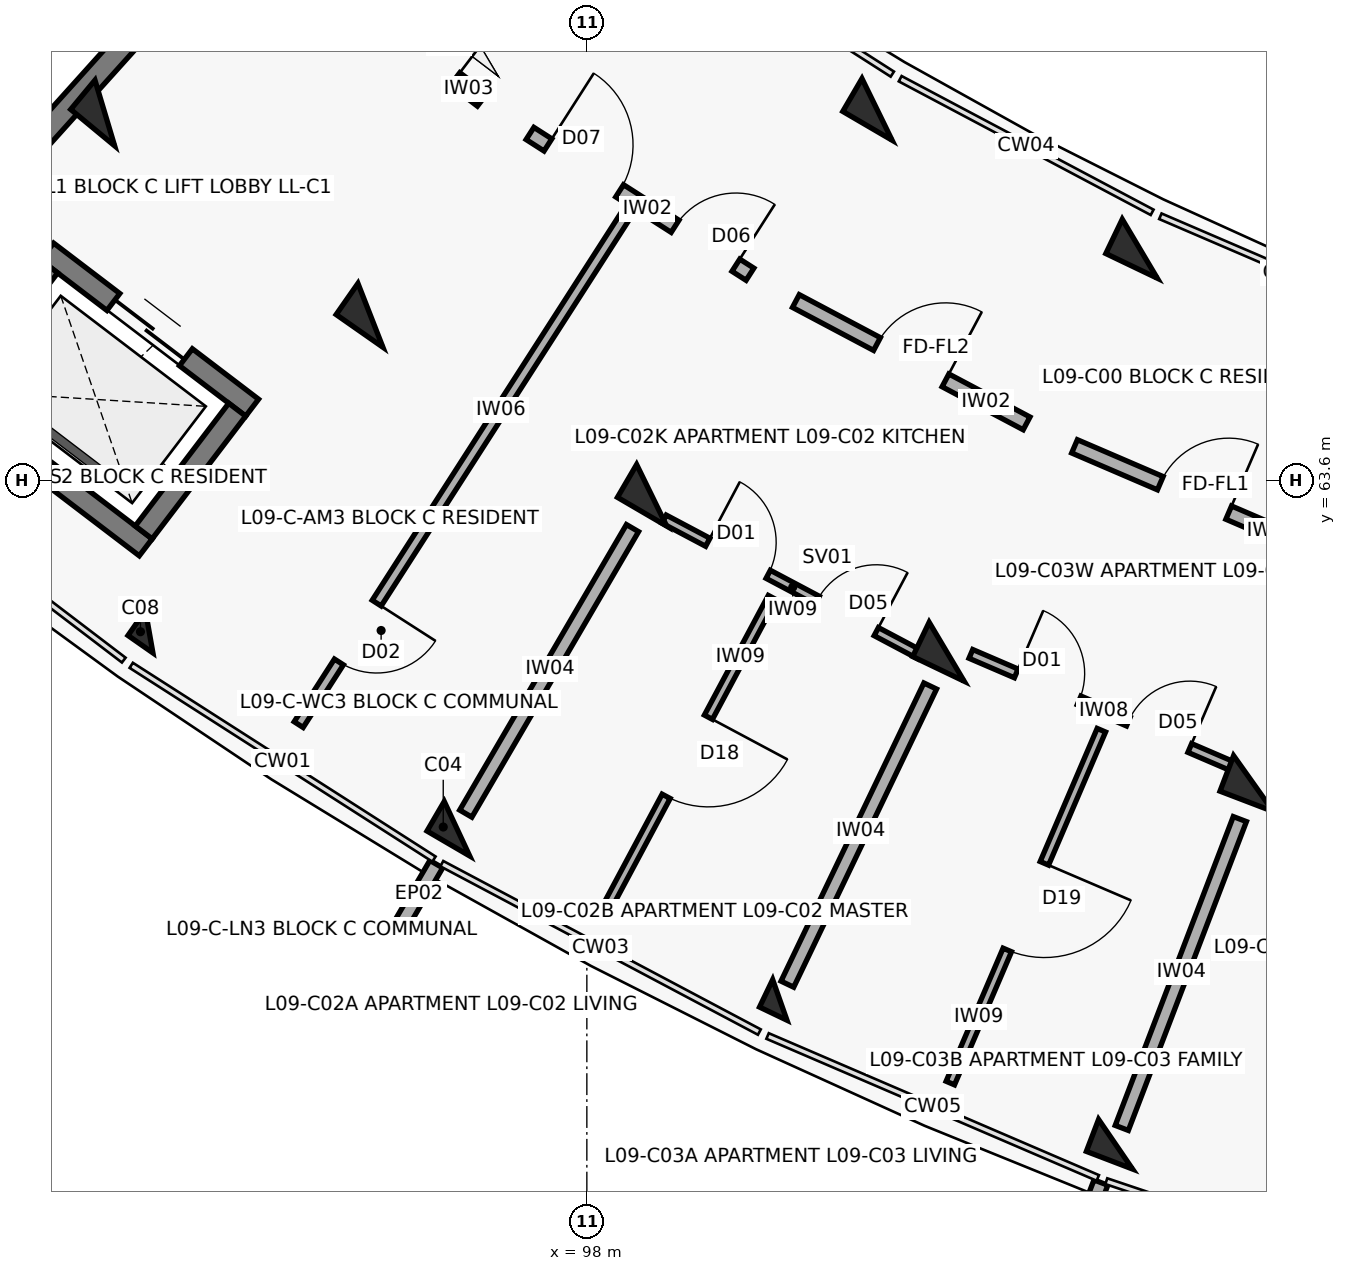
"""IFC4 building model, lengths in metres.
Left out: names, types, materials, properties, quantities, classifications, styles, units other than length and angle.
Written with IfcOpenShell. Run it as: python <this file> out.ifc"""

import sys

from ifc_helpers import new_model, si_unit, direction, frame, frame_2d, origin, origin_2d, place, context, subcontext, project, spatial, rectangle, extrude, element, fill, save


model = new_model("IFC4")
c1 = context("Model", 3, precision=1e-05, world=origin(), true_north=direction((0.0, 1.0)))
c2 = subcontext(c1, "Body", "Model", "MODEL_VIEW")
j1 = project(units=[si_unit("LENGTHUNIT", "METRE"), si_unit("PLANEANGLEUNIT", "RADIAN")], contexts=[c1])
p1 = place(None, origin())
s1 = spatial("IfcSite", under=j1, at=p1, CompositionType="ELEMENT")
p2 = place(p1, origin())
s2 = spatial("IfcBuilding", under=s1, at=p2, CompositionType="ELEMENT")
p3 = place(p2, frame((0.0, 0.0, 29.8)))
s3 = spatial("IfcBuildingStorey", under=s2, at=p3, CompositionType="ELEMENT", Elevation=29.8)
for number, where, z_axis, x_axis in (
    (1, (91.658, 68.43, 0.0), (0.0, 0.0, 1.0), (-0.638, -0.77, 0.0)),
    (2, (95.152, 65.768, 0.0), (0.0, 0.0, 1.0), (-0.573, -0.82, 0.0)),
):
    element("IfcColumn", number, at=place(p3, frame(where, z_axis=z_axis, x_axis=x_axis)), inside=s3, PredefinedType="COLUMN", context=c2, shape_type="SweptSolid", body=[
        extrude(rectangle(XDim=0.5, YDim=0.75, at=origin_2d()), origin(), (0.0, 0.0, 1.0), 3.1),
    ])
p4 = place(p3, frame((92.241, 61.605, 0.0), z_axis=(0.0, 0.0, 1.0), x_axis=(-0.573004420611, -0.819552276527, 0.0)))
e3 = element("IfcColumn", 3, at=p4, inside=s3, PredefinedType="COLUMN", context=c2, shape_type="SweptSolid", body=[
    extrude(rectangle(XDim=0.4, YDim=0.4, at=origin_2d()), origin(), (0.0, 0.0, 1.0), 3.1),
])
for number, where, z_axis, x_axis in (
    (4, (101.817, 68.478, 0.0), (0.0, 0.0, 1.0), (-0.504, -0.864, 0.0)),
    (5, (98.853, 63.4, 0.0), (0.0, 0.0, 1.0), (-0.504, -0.864, 0.0)),
):
    element("IfcColumn", number, at=place(p3, frame(where, z_axis=z_axis, x_axis=x_axis)), inside=s3, PredefinedType="COLUMN", context=c2, shape_type="SweptSolid", body=[
        extrude(rectangle(XDim=0.5, YDim=0.75, at=origin_2d()), origin(), (0.0, 0.0, 1.0), 3.1),
    ])
p5 = place(p3, frame((96.291, 59.013, 0.0), z_axis=(0.0, 0.0, 1.0), x_axis=(-0.504226211181, -0.863571611366, 0.0)))
e6 = element("IfcColumn", 6, at=p5, inside=s3, PredefinedType="COLUMN", context=c2, shape_type="SweptSolid", body=[
    extrude(rectangle(XDim=0.45, YDim=0.65, at=origin_2d()), origin(), (0.0, 0.0, 1.0), 3.1),
])
for number, where, z_axis, x_axis in (
    (7, (105.274, 66.644, 0.0), (0.0, 0.0, 1.0), (-0.432, -0.902, 0.0)),
    (8, (102.734, 61.341, 0.0), (0.0, 0.0, 1.0), (-0.432, -0.902, 0.0)),
):
    element("IfcColumn", number, at=place(p3, frame(where, z_axis=z_axis, x_axis=x_axis)), inside=s3, PredefinedType="COLUMN", context=c2, shape_type="SweptSolid", body=[
        extrude(rectangle(XDim=0.5, YDim=0.75, at=origin_2d()), origin(), (0.0, 0.0, 1.0), 3.1),
    ])
p6 = place(p3, frame((100.539, 56.76, 0.0), z_axis=(0.0, 0.0, 1.0), x_axis=(-0.432085748802, -0.901832526405, 0.0)))
e9 = element("IfcColumn", 9, at=p6, inside=s3, PredefinedType="COLUMN", context=c2, shape_type="SweptSolid", body=[
    extrude(rectangle(XDim=0.4, YDim=0.4, at=origin_2d()), origin(), (0.0, 0.0, 1.0), 3.1),
])
p7 = place(p3, frame((106.77, 59.606, 0.0), z_axis=(0.0, 0.0, 1.0), x_axis=(-0.357064076459, -0.934079892355, 0.0)))
e10 = element("IfcColumn", 10, at=p7, inside=s3, PredefinedType="COLUMN", context=c2, shape_type="SweptSolid", body=[
    extrude(rectangle(XDim=0.5, YDim=0.75, at=origin_2d()), origin(), (0.0, 0.0, 1.0), 3.1),
])
p8 = place(p3, frame((104.956, 54.861, 0.0), z_axis=(0.0, 0.0, 1.0), x_axis=(-0.357064076459, -0.934079892355, 0.0)))
e11 = element("IfcColumn", 11, at=p8, inside=s3, PredefinedType="COLUMN", context=c2, shape_type="SweptSolid", body=[
    extrude(rectangle(XDim=0.45, YDim=0.65, at=origin_2d()), origin(), (0.0, 0.0, 1.0), 3.1),
])
for number, where, z_axis, x_axis in (
    (12, (96.019, 58.547, 0.0), (0.0, 0.0, 1.0), (-0.504, -0.864, 0.0)),
    (13, (104.763, 54.357, 0.0), (0.0, 0.0, 1.0), (-0.357, -0.934, 0.0)),
):
    element("IfcWall", number, at=place(p3, frame(where, z_axis=z_axis, x_axis=x_axis)), inside=s3, PredefinedType="PARAPET", context=c2, shape_type="SweptSolid", body=[
        extrude(rectangle(XDim=0.9, YDim=0.195, at=frame_2d((0.45, 0.0))), origin(), (0.0, 0.0, 1.0), 2.25),
    ])
p9 = place(p3, frame((93.325, 70.899, 0.0), z_axis=(0.0, 0.0, 1.0), x_axis=(-0.668868253964, -0.743380964808, 0.0)))
e14 = element("IfcWall", 14, at=p9, inside=s3, PredefinedType="SHEAR", context=c2, shape_type="SweptSolid", body=[
    extrude(rectangle(XDim=7.69, YDim=0.3, at=frame_2d((3.845, 0.0))), origin(), (0.0, 0.0, 1.0), 3.1),
])
p10 = place(p3, frame((90.899, 66.607, 0.0), z_axis=(0.0, 0.0, 1.0), x_axis=(0.795439986025, -0.606032365994, 0.0)))
e15 = element("IfcWall", 15, at=p10, inside=s3, PredefinedType="SHEAR", context=c2, shape_type="SweptSolid", body=[
    extrude(rectangle(XDim=3.39, YDim=0.28, at=frame_2d((1.695, 0.0))), origin(), (0.0, 0.0, 1.0), 3.1),
])
p11 = place(p10, frame((1.095, 0.0, 0.0)))
e16 = element("IfcOpeningElement", 16, at=p11, cuts=e15, PredefinedType="OPENING", context=c2, shape_type="SweptSolid", body=[
    extrude(rectangle(XDim=1.2, YDim=2.15, at=frame_2d((0.6, 1.075))), frame((0.0, 0.15, 0.0), z_axis=(0.0, -1.0, 0.0), x_axis=(1.0, 0.0, 0.0)), (0.0, 0.0, 1.0), 0.3),
])
p12 = place(p3, frame((89.5, 64.77, 0.0), z_axis=(0.0, 0.0, 1.0), x_axis=(0.795474703455, -0.605986795371, 0.0)))
e17 = element("IfcWall", 17, at=p12, inside=s3, PredefinedType="SHEAR", context=c2, shape_type="SweptSolid", body=[
    extrude(rectangle(XDim=3.39, YDim=0.28, at=frame_2d((1.695, 0.0))), origin(), (0.0, 0.0, 1.0), 3.1),
])
p13 = place(p3, frame((90.926, 66.411, 0.0), z_axis=(0.0, 0.0, 1.0), x_axis=(-0.605948992168, -0.795503500238, 0.0)))
e18 = element("IfcWall", 18, at=p13, inside=s3, PredefinedType="SHEAR", context=c2, shape_type="SweptSolid", body=[
    extrude(rectangle(XDim=2.03, YDim=0.28, at=frame_2d((1.015, 0.0))), origin(), (0.0, 0.0, 1.0), 3.1),
])
p14 = place(p3, frame((93.4, 64.526, 0.0), z_axis=(0.0, 0.0, 1.0), x_axis=(-0.605891019062, -0.795547656033, 0.0)))
e19 = element("IfcWall", 19, at=p14, inside=s3, PredefinedType="SHEAR", context=c2, shape_type="SweptSolid", body=[
    extrude(rectangle(XDim=2.03, YDim=0.28, at=frame_2d((1.015, 0.0))), origin(), (0.0, 0.0, 1.0), 3.1),
])
p15 = place(p3, frame((94.001, 70.602, 0.0), z_axis=(0.0, 0.0, 1.0), x_axis=(0.795498026433, -0.605956178235, 0.0)))
e20 = element("IfcWall", 20, at=p15, inside=s3, PredefinedType="SOLIDWALL", context=c2, shape_type="SweptSolid", body=[
    extrude(rectangle(XDim=3.296, YDim=0.21, at=frame_2d((1.648, 0.0))), origin(), (0.0, 0.0, 1.0), 2.14),
])
p16 = place(p15, frame((0.45, 0.0, 0.0)))
e21 = element("IfcOpeningElement", 21, at=p16, cuts=e20, PredefinedType="OPENING", context=c2, shape_type="SweptSolid", body=[
    extrude(rectangle(XDim=1.1, YDim=2.15, at=frame_2d((0.55, 1.075))), frame((0.0, 0.115, 0.0), z_axis=(0.0, -1.0, 0.0), x_axis=(1.0, 0.0, 0.0)), (0.0, 0.0, 1.0), 0.23),
])
p17 = place(p15, frame((1.726, 0.0, 0.0)))
e22 = element("IfcOpeningElement", 22, at=p17, cuts=e20, PredefinedType="OPENING", context=c2, shape_type="SweptSolid", body=[
    extrude(rectangle(XDim=1.12, YDim=2.15, at=frame_2d((0.56, 1.075))), frame((0.0, 0.115, 0.0), z_axis=(0.0, -1.0, 0.0), x_axis=(1.0, 0.0, 0.0)), (0.0, 0.0, 1.0), 0.23),
])
p18 = place(p3, frame((97.252, 68.161, 0.0), z_axis=(0.0, 0.0, 1.0), x_axis=(0.842289466461, -0.53902546757, 0.0)))
e23 = element("IfcWall", 23, at=p18, inside=s3, PredefinedType="SOLIDWALL", context=c2, shape_type="SweptSolid", body=[
    extrude(rectangle(XDim=3.436, YDim=0.19, at=frame_2d((1.718, 0.0))), origin(), (0.0, 0.0, 1.0), 2.14),
])
p19 = place(p18, frame((0.28, 0.0, 0.0)))
e24 = element("IfcOpeningElement", 24, at=p19, cuts=e23, PredefinedType="OPENING", context=c2, shape_type="SweptSolid", body=[
    extrude(rectangle(XDim=1.12, YDim=2.15, at=frame_2d((0.56, 1.075))), frame((0.0, 0.105, 0.0), z_axis=(0.0, -1.0, 0.0), x_axis=(1.0, 0.0, 0.0)), (0.0, 0.0, 1.0), 0.21),
])
p20 = place(p18, frame((2.266, 0.0, 0.0)))
e25 = element("IfcOpeningElement", 25, at=p20, cuts=e23, PredefinedType="OPENING", context=c2, shape_type="SweptSolid", body=[
    extrude(rectangle(XDim=0.95, YDim=2.1, at=frame_2d((0.475, 1.05))), frame((0.0, 0.105, 0.0), z_axis=(0.0, -1.0, 0.0), x_axis=(1.0, 0.0, 0.0)), (0.0, 0.0, 1.0), 0.21),
])
p21 = place(p3, frame((98.504, 67.072, 0.0), z_axis=(0.0, 0.0, 1.0), x_axis=(-0.540338452216, -0.841447774408, 0.0)))
e26 = element("IfcWall", 26, at=p21, inside=s3, PredefinedType="PARTITIONING", context=c2, shape_type="SweptSolid", body=[
    extrude(rectangle(XDim=7.95, YDim=0.14, at=frame_2d((3.975, 0.0))), origin(), (0.0, 0.0, 1.0), 2.14),
])
p22 = place(p21, frame((6.05, 0.0, 0.0)))
e27 = element("IfcOpeningElement", 27, at=p22, cuts=e26, PredefinedType="OPENING", context=c2, shape_type="SweptSolid", body=[
    extrude(rectangle(XDim=0.92, YDim=2.1, at=frame_2d((0.46, 1.05))), frame((0.0, 0.08, 0.0), z_axis=(0.0, -1.0, 0.0), x_axis=(1.0, 0.0, 0.0)), (0.0, 0.0, 1.0), 0.16),
])
p23 = place(p3, frame((100.75, 65.956, 0.0), z_axis=(0.0, 0.0, 1.0), x_axis=(0.883440266101, -0.468543803963, 0.0)))
e28 = element("IfcWall", 28, at=p23, inside=s3, PredefinedType="SOLIDWALL", context=c2, shape_type="SweptSolid", body=[
    extrude(rectangle(XDim=3.436, YDim=0.19, at=frame_2d((1.718, 0.0))), origin(), (0.0, 0.0, 1.0), 2.14),
])
p24 = place(p23, frame((1.208, 0.0, 0.0)))
e29 = element("IfcOpeningElement", 29, at=p24, cuts=e28, PredefinedType="OPENING", context=c2, shape_type="SweptSolid", body=[
    extrude(rectangle(XDim=1.02, YDim=2.15, at=frame_2d((0.51, 1.075))), frame((0.0, 0.105, 0.0), z_axis=(0.0, -1.0, 0.0), x_axis=(1.0, 0.0, 0.0)), (0.0, 0.0, 1.0), 0.21),
])
p25 = place(p3, frame((99.017, 63.087, 0.0), z_axis=(0.0, 0.0, 1.0), x_axis=(0.883415075746, -0.468591297342, 0.0)))
e30 = element("IfcWall", 30, at=p25, inside=s3, PredefinedType="PARTITIONING", context=c2, shape_type="SweptSolid", body=[
    extrude(rectangle(XDim=3.81, YDim=0.12, at=frame_2d((1.905, 0.0))), origin(), (0.0, 0.0, 1.0), 2.14),
])
p26 = place(p25, frame((0.65, 0.0, 0.0)))
e31 = element("IfcOpeningElement", 31, at=p26, cuts=e30, PredefinedType="OPENING", context=c2, shape_type="SweptSolid", body=[
    extrude(rectangle(XDim=0.9, YDim=2.1, at=frame_2d((0.45, 1.05))), frame((0.0, 0.07, 0.0), z_axis=(0.0, -1.0, 0.0), x_axis=(1.0, 0.0, 0.0)), (0.0, 0.0, 1.0), 0.14),
])
p27 = place(p25, frame((2.28, 0.0, 0.0)))
e32 = element("IfcOpeningElement", 32, at=p27, cuts=e30, PredefinedType="OPENING", context=c2, shape_type="SweptSolid", body=[
    extrude(rectangle(XDim=0.88, YDim=2.1, at=frame_2d((0.44, 1.05))), frame((0.0, 0.07, 0.0), z_axis=(0.0, -1.0, 0.0), x_axis=(1.0, 0.0, 0.0)), (0.0, 0.0, 1.0), 0.14),
])
p28 = place(p3, frame((100.44, 62.054, 0.0), z_axis=(0.0, 0.0, 1.0), x_axis=(-0.471207016772, -0.882022645596, 0.0)))
e33 = element("IfcWall", 33, at=p28, inside=s3, PredefinedType="PARTITIONING", context=c2, shape_type="SweptSolid", body=[
    extrude(rectangle(XDim=4.75, YDim=0.12, at=frame_2d((2.375, 0.0))), origin(), (0.0, 0.0, 1.0), 2.14),
])
p29 = place(p28, frame((1.785, 0.0, 0.0)))
e34 = element("IfcOpeningElement", 34, at=p29, cuts=e33, PredefinedType="OPENING", context=c2, shape_type="SweptSolid", body=[
    extrude(rectangle(XDim=1.18, YDim=2.1, at=frame_2d((0.59, 1.05))), frame((0.0, 0.07, 0.0), z_axis=(0.0, -1.0, 0.0), x_axis=(1.0, 0.0, 0.0)), (0.0, 0.0, 1.0), 0.14),
])
p30 = place(p3, frame((98.601, 62.968, 0.0), z_axis=(0.0, 0.0, 1.0), x_axis=(-0.504216452091, -0.863577309475, 0.0)))
e35 = element("IfcWall", 35, at=p30, inside=s3, PredefinedType="SOLIDWALL", context=c2, shape_type="SweptSolid", body=[
    extrude(rectangle(XDim=4.35, YDim=0.185, at=frame_2d((2.175, 0.0))), origin(), (0.0, 0.0, 1.0), 2.14),
])
p31 = place(p3, frame((104.417, 64.044, 0.0), z_axis=(0.0, 0.0, 1.0), x_axis=(0.918718172399, -0.394913813008, 0.0)))
e36 = element("IfcWall", 36, at=p31, inside=s3, PredefinedType="SOLIDWALL", context=c2, shape_type="SweptSolid", body=[
    extrude(rectangle(XDim=3.436, YDim=0.19, at=frame_2d((1.718, 0.0))), origin(), (0.0, 0.0, 1.0), 2.14),
])
p32 = place(p31, frame((1.228, 0.0, 0.0)))
e37 = element("IfcOpeningElement", 37, at=p32, cuts=e36, PredefinedType="OPENING", context=c2, shape_type="SweptSolid", body=[
    extrude(rectangle(XDim=0.98, YDim=2.15, at=frame_2d((0.49, 1.075))), frame((0.0, 0.105, 0.0), z_axis=(0.0, -1.0, 0.0), x_axis=(1.0, 0.0, 0.0)), (0.0, 0.0, 1.0), 0.21),
])
p33 = place(p3, frame((103.052, 61.313, 0.0), z_axis=(0.0, 0.0, 1.0), x_axis=(0.918714121981, -0.39492323567, 0.0)))
e38 = element("IfcWall", 38, at=p33, inside=s3, PredefinedType="PARTITIONING", context=c2, shape_type="SweptSolid", body=[
    extrude(rectangle(XDim=3.785, YDim=0.125, at=frame_2d((1.893, 0.0))), origin(), (0.0, 0.0, 1.0), 2.14),
])
p34 = place(p33, frame((0.65, 0.0, 0.0)))
e39 = element("IfcOpeningElement", 39, at=p34, cuts=e38, PredefinedType="OPENING", context=c2, shape_type="SweptSolid", body=[
    extrude(rectangle(XDim=0.9, YDim=2.1, at=frame_2d((0.45, 1.05))), frame((0.0, 0.073, 0.0), z_axis=(0.0, -1.0, 0.0), x_axis=(1.0, 0.0, 0.0)), (0.0, 0.0, 1.0), 0.145),
])
p35 = place(p33, frame((2.255, 0.0, 0.0)))
e40 = element("IfcOpeningElement", 40, at=p35, cuts=e38, PredefinedType="OPENING", context=c2, shape_type="SweptSolid", body=[
    extrude(rectangle(XDim=0.88, YDim=2.1, at=frame_2d((0.44, 1.05))), frame((0.0, 0.073, 0.0), z_axis=(0.0, -1.0, 0.0), x_axis=(1.0, 0.0, 0.0)), (0.0, 0.0, 1.0), 0.145),
])
p36 = place(p3, frame((104.769, 60.309, 0.0), z_axis=(0.0, 0.0, 1.0), x_axis=(-0.393522505308, -0.919314982917, 0.0)))
e41 = element("IfcWall", 41, at=p36, inside=s3, PredefinedType="PARTITIONING", context=c2, shape_type="SweptSolid", body=[
    extrude(rectangle(XDim=5.05, YDim=0.12, at=frame_2d((2.525, 0.0))), origin(), (0.0, 0.0, 1.0), 2.14),
])
p37 = place(p36, frame((1.905, 0.0, 0.0)))
e42 = element("IfcOpeningElement", 42, at=p37, cuts=e41, PredefinedType="OPENING", context=c2, shape_type="SweptSolid", body=[
    extrude(rectangle(XDim=1.24, YDim=2.1, at=frame_2d((0.62, 1.05))), frame((0.0, 0.07, 0.0), z_axis=(0.0, -1.0, 0.0), x_axis=(1.0, 0.0, 0.0)), (0.0, 0.0, 1.0), 0.14),
])
p38 = place(p3, frame((102.518, 60.89, 0.0), z_axis=(0.0, 0.0, 1.0), x_axis=(-0.432108769108, -0.901821496561, 0.0)))
e43 = element("IfcWall", 43, at=p38, inside=s3, PredefinedType="SOLIDWALL", context=c2, shape_type="SweptSolid", body=[
    extrude(rectangle(XDim=4.35, YDim=0.185, at=frame_2d((2.175, 0.0))), origin(), (0.0, 0.0, 1.0), 2.14),
])
p39 = place(p3, frame((106.591, 59.139, 0.0), z_axis=(0.0, 0.0, 1.0), x_axis=(-0.357064016205, -0.934079915388, 0.0)))
e44 = element("IfcWall", 44, at=p39, inside=s3, PredefinedType="SOLIDWALL", context=c2, shape_type="SweptSolid", body=[
    extrude(rectangle(XDim=4.35, YDim=0.185, at=frame_2d((2.175, 0.0))), origin(), (0.0, 0.0, 1.0), 2.14),
])
p40 = place(p11, origin())
e45 = element("IfcDoor", 45, at=p40, inside=s3, OperationType="DOUBLE_DOOR_SLIDING", PredefinedType="DOOR", context=c2, shape_type="SweptSolid", body=[
    extrude(rectangle(XDim=1.2, YDim=2.15, at=frame_2d((0.6, 1.075))), frame((0.0, 0.025, 0.0), z_axis=(0.0, -1.0, 0.0), x_axis=(1.0, 0.0, 0.0)), (0.0, 0.0, 1.0), 0.05),
])
fill(e16, e45)
p41 = place(p17, origin())
e46 = element("IfcDoor", 46, at=p41, inside=s3, OperationType="SINGLE_SWING_RIGHT", PredefinedType="DOOR", context=c2, shape_type="SweptSolid", body=[
    extrude(rectangle(XDim=1.12, YDim=2.15, at=frame_2d((0.56, 1.075))), frame((0.0, 0.025, 0.0), z_axis=(0.0, -1.0, 0.0), x_axis=(1.0, 0.0, 0.0)), (0.0, 0.0, 1.0), 0.05),
])
fill(e22, e46)
p42 = place(p19, origin())
e47 = element("IfcDoor", 47, at=p42, inside=s3, OperationType="SINGLE_SWING_LEFT", PredefinedType="DOOR", context=c2, shape_type="SweptSolid", body=[
    extrude(rectangle(XDim=1.12, YDim=2.15, at=frame_2d((0.56, 1.075))), frame((0.0, 0.025, 0.0), z_axis=(0.0, -1.0, 0.0), x_axis=(1.0, 0.0, 0.0)), (0.0, 0.0, 1.0), 0.05),
])
fill(e24, e47)
p43 = place(p20, origin())
e48 = element("IfcDoor", 48, at=p43, inside=s3, OperationType="SINGLE_SWING_RIGHT", PredefinedType="DOOR", context=c2, shape_type="SweptSolid", body=[
    extrude(rectangle(XDim=0.95, YDim=2.1, at=frame_2d((0.475, 1.05))), frame((0.0, 0.025, 0.0), z_axis=(0.0, -1.0, 0.0), x_axis=(1.0, 0.0, 0.0)), (0.0, 0.0, 1.0), 0.05),
])
fill(e25, e48)
p44 = place(p22, origin())
e49 = element("IfcDoor", 49, at=p44, inside=s3, OperationType="SINGLE_SWING_LEFT", PredefinedType="DOOR", context=c2, shape_type="SweptSolid", body=[
    extrude(rectangle(XDim=0.92, YDim=2.1, at=frame_2d((0.46, 1.05))), frame((0.0, 0.025, 0.0), z_axis=(0.0, -1.0, 0.0), x_axis=(1.0, 0.0, 0.0)), (0.0, 0.0, 1.0), 0.05),
])
fill(e27, e49)
p45 = place(p24, origin())
e50 = element("IfcDoor", 50, at=p45, inside=s3, OperationType="SINGLE_SWING_RIGHT", PredefinedType="DOOR", context=c2, shape_type="SweptSolid", body=[
    extrude(rectangle(XDim=1.02, YDim=2.15, at=frame_2d((0.51, 1.075))), frame((0.0, 0.025, 0.0), z_axis=(0.0, -1.0, 0.0), x_axis=(1.0, 0.0, 0.0)), (0.0, 0.0, 1.0), 0.05),
])
fill(e29, e50)
p46 = place(p26, origin())
e51 = element("IfcDoor", 51, at=p46, inside=s3, OperationType="SINGLE_SWING_LEFT", PredefinedType="DOOR", context=c2, shape_type="SweptSolid", body=[
    extrude(rectangle(XDim=0.9, YDim=2.1, at=frame_2d((0.45, 1.05))), frame((0.0, 0.025, 0.0), z_axis=(0.0, -1.0, 0.0), x_axis=(1.0, 0.0, 0.0)), (0.0, 0.0, 1.0), 0.05),
])
fill(e31, e51)
p47 = place(p27, origin())
e52 = element("IfcDoor", 52, at=p47, inside=s3, OperationType="SINGLE_SWING_RIGHT", PredefinedType="DOOR", context=c2, shape_type="SweptSolid", body=[
    extrude(rectangle(XDim=0.88, YDim=2.1, at=frame_2d((0.44, 1.05))), frame((0.0, 0.025, 0.0), z_axis=(0.0, -1.0, 0.0), x_axis=(1.0, 0.0, 0.0)), (0.0, 0.0, 1.0), 0.05),
])
fill(e32, e52)
p48 = place(p29, origin())
e53 = element("IfcDoor", 53, at=p48, inside=s3, OperationType="SINGLE_SWING_LEFT", PredefinedType="DOOR", context=c2, shape_type="SweptSolid", body=[
    extrude(rectangle(XDim=1.18, YDim=2.1, at=frame_2d((0.59, 1.05))), frame((0.0, 0.025, 0.0), z_axis=(0.0, -1.0, 0.0), x_axis=(1.0, 0.0, 0.0)), (0.0, 0.0, 1.0), 0.05),
])
fill(e34, e53)
p49 = place(p32, origin())
e54 = element("IfcDoor", 54, at=p49, inside=s3, OperationType="SINGLE_SWING_RIGHT", PredefinedType="DOOR", context=c2, shape_type="SweptSolid", body=[
    extrude(rectangle(XDim=0.98, YDim=2.15, at=frame_2d((0.49, 1.075))), frame((0.0, 0.025, 0.0), z_axis=(0.0, -1.0, 0.0), x_axis=(1.0, 0.0, 0.0)), (0.0, 0.0, 1.0), 0.05),
])
fill(e37, e54)
p50 = place(p34, origin())
e55 = element("IfcDoor", 55, at=p50, inside=s3, OperationType="SINGLE_SWING_LEFT", PredefinedType="DOOR", context=c2, shape_type="SweptSolid", body=[
    extrude(rectangle(XDim=0.9, YDim=2.1, at=frame_2d((0.45, 1.05))), frame((0.0, 0.025, 0.0), z_axis=(0.0, -1.0, 0.0), x_axis=(1.0, 0.0, 0.0)), (0.0, 0.0, 1.0), 0.05),
])
fill(e39, e55)
p51 = place(p35, origin())
e56 = element("IfcDoor", 56, at=p51, inside=s3, OperationType="SINGLE_SWING_RIGHT", PredefinedType="DOOR", context=c2, shape_type="SweptSolid", body=[
    extrude(rectangle(XDim=0.88, YDim=2.1, at=frame_2d((0.44, 1.05))), frame((0.0, 0.025, 0.0), z_axis=(0.0, -1.0, 0.0), x_axis=(1.0, 0.0, 0.0)), (0.0, 0.0, 1.0), 0.05),
])
fill(e40, e56)
p52 = place(p37, origin())
e57 = element("IfcDoor", 57, at=p52, inside=s3, OperationType="SINGLE_SWING_LEFT", PredefinedType="DOOR", context=c2, shape_type="SweptSolid", body=[
    extrude(rectangle(XDim=1.24, YDim=2.1, at=frame_2d((0.62, 1.05))), frame((0.0, 0.025, 0.0), z_axis=(0.0, -1.0, 0.0), x_axis=(1.0, 0.0, 0.0)), (0.0, 0.0, 1.0), 0.05),
])
fill(e42, e57)
save(model, sys.argv[1])
